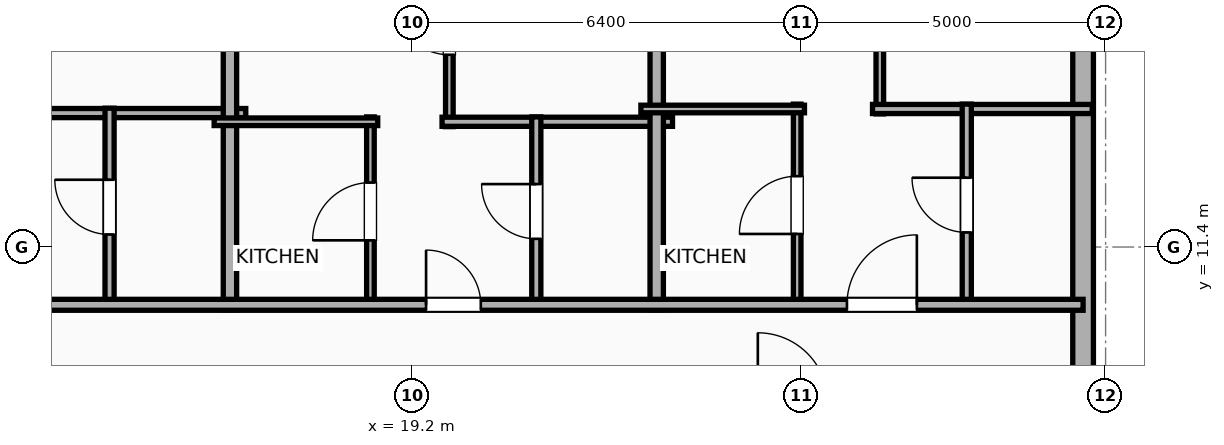
"""IFC4 building model, lengths in metres.
Left out: names, types, materials, properties, quantities, classifications, styles, units other than length and angle.
Written with IfcOpenShell. Run it as: python <this file> out.ifc"""

import sys

from ifc_helpers import new_model, si_unit, direction, frame, frame_2d, origin, place, context, subcontext, project, spatial, rectangle, extrude, element, fill, save


model = new_model("IFC4")
c1 = context("Model", 3, precision=1e-05, world=origin(), true_north=direction((0.0, 1.0)))
c2 = subcontext(c1, "Body", "Model", "MODEL_VIEW")
j1 = project(units=[si_unit("LENGTHUNIT", "METRE"), si_unit("PLANEANGLEUNIT", "RADIAN")], contexts=[c1])
p1 = place(None, origin())
s1 = spatial("IfcSite", under=j1, at=p1, CompositionType="ELEMENT")
p2 = place(p1, origin())
s2 = spatial("IfcBuilding", under=s1, at=p2, CompositionType="ELEMENT")
p3 = place(p2, frame((0.0, 0.0, 239.2)))
s3 = spatial("IfcBuildingStorey", under=s2, at=p3, CompositionType="ELEMENT", Elevation=239.2)
p4 = place(p3, frame((30.23, 16.583, 0.0), z_axis=(0.0, 0.0, 1.0), x_axis=(0.0, -1.0, 0.0)))
e1 = element("IfcWall", 1, at=p4, inside=s3, PredefinedType="ELEMENTEDWALL", context=c2, shape_type="SweptSolid", body=[
    extrude(rectangle(XDim=31.967, YDim=0.34, at=frame_2d((15.983, 0.0))), origin(), (0.0, 0.0, 1.0), 3.65),
])
p5 = place(p4, frame((29.924, 0.0, 0.75)))
e2 = element("IfcOpeningElement", 2, at=p5, cuts=e1, PredefinedType="OPENING", context=c2, shape_type="SweptSolid", body=[
    extrude(rectangle(XDim=1.2, YDim=2.05, at=frame_2d((0.6, 1.025))), frame((0.0, 0.18, 0.0), z_axis=(0.0, -1.0, 0.0), x_axis=(1.0, 0.0, 0.0)), (0.0, 0.0, 1.0), 0.36),
])
p6 = place(p4, frame((11.463, 0.0, 0.75)))
e3 = element("IfcOpeningElement", 3, at=p6, cuts=e1, PredefinedType="OPENING", context=c2, shape_type="SweptSolid", body=[
    extrude(rectangle(XDim=1.2, YDim=2.05, at=frame_2d((0.6, 1.025))), frame((0.0, 0.18, 0.0), z_axis=(0.0, -1.0, 0.0), x_axis=(1.0, 0.0, 0.0)), (0.0, 0.0, 1.0), 0.36),
])
p7 = place(p4, frame((20.363, 0.0, 0.75)))
e4 = element("IfcOpeningElement", 4, at=p7, cuts=e1, PredefinedType="OPENING", context=c2, shape_type="SweptSolid", body=[
    extrude(rectangle(XDim=1.2, YDim=2.05, at=frame_2d((0.6, 1.025))), frame((0.0, 0.18, 0.0), z_axis=(0.0, -1.0, 0.0), x_axis=(1.0, 0.0, 0.0)), (0.0, 0.0, 1.0), 0.36),
])
p8 = place(p3, frame((12.67, 13.603, 0.0), z_axis=(0.0, 0.0, 1.0), x_axis=(1.0, 0.0, 0.0)))
e5 = element("IfcWall", 5, at=p8, inside=s3, PredefinedType="PLUMBINGWALL", context=c2, shape_type="SweptSolid", body=[
    extrude(rectangle(XDim=3.79, YDim=0.15, at=frame_2d((1.895, 0.0))), origin(), (0.0, 0.0, 1.0), 3.65),
])
p9 = place(p3, frame((14.22, 10.43, 0.0), z_axis=(0.0, 0.0, 1.0), x_axis=(0.0, 1.0, 0.0)))
e6 = element("IfcWall", 6, at=p9, inside=s3, PredefinedType="PLUMBINGWALL", context=c2, shape_type="SweptSolid", body=[
    extrude(rectangle(XDim=3.253, YDim=0.15, at=frame_2d((1.626, 0.0))), origin(), (0.0, 0.0, 1.0), 3.65),
])
p10 = place(p9, frame((1.177, 0.0, 0.0)))
e7 = element("IfcOpeningElement", 7, at=p10, cuts=e6, PredefinedType="OPENING", context=c2, shape_type="SweptSolid", body=[
    extrude(rectangle(XDim=0.9, YDim=2.05, at=frame_2d((0.45, 1.025))), frame((0.0, 0.085, 0.0), z_axis=(0.0, -1.0, 0.0), x_axis=(1.0, 0.0, 0.0)), (0.0, 0.0, 1.0), 0.17),
])
p11 = place(p3, frame((16.2, 10.37, 0.0), z_axis=(0.0, 0.0, 1.0), x_axis=(0.0, 1.0, 0.0)))
e8 = element("IfcWall", 8, at=p11, inside=s3, PredefinedType="PARTITIONING", context=c2, shape_type="SweptSolid", body=[
    extrude(rectangle(XDim=9.66, YDim=0.22, at=frame_2d((4.83, 0.0))), origin(), (0.0, 0.0, 1.0), 3.09),
])
p12 = place(p3, frame((19.808, 13.38, 0.0), z_axis=(0.0, 0.0, 1.0), x_axis=(0.0, 1.0, 0.0)))
e9 = element("IfcWall", 9, at=p12, inside=s3, PredefinedType="PARTITIONING", context=c2, shape_type="SweptSolid", body=[
    extrude(rectangle(XDim=6.8, YDim=0.125, at=frame_2d((3.4, 0.0))), origin(), (0.0, 0.0, 1.0), 3.65),
])
p13 = place(p12, frame((1.182, 0.0, 0.0)))
e10 = element("IfcOpeningElement", 10, at=p13, cuts=e9, PredefinedType="OPENING", context=c2, shape_type="SweptSolid", body=[
    extrude(rectangle(XDim=0.9, YDim=2.05, at=frame_2d((0.45, 1.025))), frame((0.0, 0.073, 0.0), z_axis=(0.0, -1.0, 0.0), x_axis=(1.0, 0.0, 0.0)), (0.0, 0.0, 1.0), 0.145),
])
p14 = place(p3, frame((19.688, 13.46, 0.0), z_axis=(0.0, 0.0, 1.0), x_axis=(1.0, 0.0, 0.0)))
e11 = element("IfcWall", 11, at=p14, inside=s3, PredefinedType="PLUMBINGWALL", context=c2, shape_type="SweptSolid", body=[
    extrude(rectangle(XDim=3.79, YDim=0.15, at=frame_2d((1.895, 0.0))), origin(), (0.0, 0.0, 1.0), 3.65),
])
p15 = place(p3, frame((18.51, 10.43, 0.0), z_axis=(0.0, 0.0, 1.0), x_axis=(0.0, 1.0, 0.0)))
e12 = element("IfcWall", 12, at=p15, inside=s3, PredefinedType="PARTITIONING", context=c2, shape_type="SweptSolid", body=[
    extrude(rectangle(XDim=3.11, YDim=0.125, at=frame_2d((1.555, 0.0))), origin(), (0.0, 0.0, 1.0), 3.65),
])
p16 = place(p15, frame((1.08, 0.0, 0.0)))
e13 = element("IfcOpeningElement", 13, at=p16, cuts=e12, PredefinedType="OPENING", context=c2, shape_type="SweptSolid", body=[
    extrude(rectangle(XDim=0.95, YDim=2.05, at=frame_2d((0.475, 1.025))), frame((0.0, 0.073, 0.0), z_axis=(0.0, -1.0, 0.0), x_axis=(1.0, 0.0, 0.0)), (0.0, 0.0, 1.0), 0.145),
])
p17 = place(p3, frame((15.94, 13.46, 0.0), z_axis=(0.0, 0.0, 1.0), x_axis=(1.0, 0.0, 0.0)))
e14 = element("IfcWall", 14, at=p17, inside=s3, PredefinedType="PARTITIONING", context=c2, shape_type="SweptSolid", body=[
    extrude(rectangle(XDim=2.69, YDim=0.125, at=frame_2d((1.345, 0.0))), origin(), (0.0, 0.0, 1.0), 3.65),
])
p18 = place(p3, frame((21.238, 10.43, 0.0), z_axis=(0.0, 0.0, 1.0), x_axis=(0.0, 1.0, 0.0)))
e15 = element("IfcWall", 15, at=p18, inside=s3, PredefinedType="PLUMBINGWALL", context=c2, shape_type="SweptSolid", body=[
    extrude(rectangle(XDim=3.11, YDim=0.15, at=frame_2d((1.555, 0.0))), origin(), (0.0, 0.0, 1.0), 3.65),
])
p19 = place(p18, frame((1.105, 0.0, 0.0)))
e16 = element("IfcOpeningElement", 16, at=p19, cuts=e15, PredefinedType="OPENING", context=c2, shape_type="SweptSolid", body=[
    extrude(rectangle(XDim=0.9, YDim=2.05, at=frame_2d((0.45, 1.025))), frame((0.0, 0.085, 0.0), z_axis=(0.0, -1.0, 0.0), x_axis=(1.0, 0.0, 0.0)), (0.0, 0.0, 1.0), 0.17),
])
p20 = place(p3, frame((23.218, 10.37, 0.0), z_axis=(0.0, 0.0, 1.0), x_axis=(0.0, 1.0, 0.0)))
e17 = element("IfcWall", 17, at=p20, inside=s3, PredefinedType="PARTITIONING", context=c2, shape_type="SweptSolid", body=[
    extrude(rectangle(XDim=9.66, YDim=0.22, at=frame_2d((4.83, 0.0))), origin(), (0.0, 0.0, 1.0), 3.65),
])
p21 = place(p3, frame((26.887, 13.59, 0.0), z_axis=(0.0, 0.0, 1.0), x_axis=(0.0, 1.0, 0.0)))
e18 = element("IfcWall", 18, at=p21, inside=s3, PredefinedType="PARTITIONING", context=c2, shape_type="SweptSolid", body=[
    extrude(rectangle(XDim=6.572, YDim=0.125, at=frame_2d((3.286, 0.0))), origin(), (0.0, 0.0, 1.0), 3.65),
])
p22 = place(p21, frame((1.127, 0.0, 0.0)))
e19 = element("IfcOpeningElement", 19, at=p22, cuts=e18, PredefinedType="OPENING", context=c2, shape_type="SweptSolid", body=[
    extrude(rectangle(XDim=0.9, YDim=2.05, at=frame_2d((0.45, 1.025))), frame((0.0, 0.073, 0.0), z_axis=(0.0, -1.0, 0.0), x_axis=(1.0, 0.0, 0.0)), (0.0, 0.0, 1.0), 0.145),
])
p23 = place(p3, frame((26.767, 13.67, 0.0), z_axis=(0.0, 0.0, 1.0), x_axis=(1.0, 0.0, 0.0)))
e20 = element("IfcWall", 20, at=p23, inside=s3, PredefinedType="PLUMBINGWALL", context=c2, shape_type="SweptSolid", body=[
    extrude(rectangle(XDim=3.613, YDim=0.15, at=frame_2d((1.806, 0.0))), origin(), (0.0, 0.0, 1.0), 3.65),
])
p24 = place(p3, frame((25.528, 10.43, 0.0), z_axis=(0.0, 0.0, 1.0), x_axis=(0.0, 1.0, 0.0)))
e21 = element("IfcWall", 21, at=p24, inside=s3, PredefinedType="PARTITIONING", context=c2, shape_type="SweptSolid", body=[
    extrude(rectangle(XDim=3.32, YDim=0.125, at=frame_2d((1.66, 0.0))), origin(), (0.0, 0.0, 1.0), 3.65),
])
p25 = place(p24, frame((1.185, 0.0, 0.0)))
e22 = element("IfcOpeningElement", 22, at=p25, cuts=e21, PredefinedType="OPENING", context=c2, shape_type="SweptSolid", body=[
    extrude(rectangle(XDim=0.95, YDim=2.05, at=frame_2d((0.475, 1.025))), frame((0.0, 0.073, 0.0), z_axis=(0.0, -1.0, 0.0), x_axis=(1.0, 0.0, 0.0)), (0.0, 0.0, 1.0), 0.145),
])
p26 = place(p3, frame((22.958, 13.67, 0.0), z_axis=(0.0, 0.0, 1.0), x_axis=(1.0, 0.0, 0.0)))
e23 = element("IfcWall", 23, at=p26, inside=s3, PredefinedType="PARTITIONING", context=c2, shape_type="SweptSolid", body=[
    extrude(rectangle(XDim=2.69, YDim=0.125, at=frame_2d((1.345, 0.0))), origin(), (0.0, 0.0, 1.0), 3.65),
])
p27 = place(p3, frame((28.317, 10.43, 0.0), z_axis=(0.0, 0.0, 1.0), x_axis=(0.0, 1.0, 0.0)))
e24 = element("IfcWall", 24, at=p27, inside=s3, PredefinedType="PLUMBINGWALL", context=c2, shape_type="SweptSolid", body=[
    extrude(rectangle(XDim=3.32, YDim=0.15, at=frame_2d((1.66, 0.0))), origin(), (0.0, 0.0, 1.0), 3.65),
])
p28 = place(p27, frame((1.21, 0.0, 0.0)))
e25 = element("IfcOpeningElement", 25, at=p28, cuts=e24, PredefinedType="OPENING", context=c2, shape_type="SweptSolid", body=[
    extrude(rectangle(XDim=0.9, YDim=2.05, at=frame_2d((0.45, 1.025))), frame((0.0, 0.085, 0.0), z_axis=(0.0, -1.0, 0.0), x_axis=(1.0, 0.0, 0.0)), (0.0, 0.0, 1.0), 0.17),
])
p29 = place(p3, frame((-26.23, 10.45, 0.0), z_axis=(0.0, 0.0, 1.0), x_axis=(1.0, 0.0, 0.0)))
e26 = element("IfcWall", 26, at=p29, inside=s3, PredefinedType="PARTITIONING", context=c2, shape_type="SweptSolid", body=[
    extrude(rectangle(XDim=56.46, YDim=0.18, at=frame_2d((28.23, 0.0))), origin(), (0.0, 0.0, 1.0), 3.65),
])
p30 = place(p29, frame((4.41, 0.0, 0.0)))
e27 = element("IfcOpeningElement", 27, at=p30, cuts=e26, PredefinedType="OPENING", context=c2, shape_type="SweptSolid", body=[
    extrude(rectangle(XDim=1.15, YDim=2.05, at=frame_2d((0.575, 1.025))), frame((0.0, 0.1, 0.0), z_axis=(0.0, -1.0, 0.0), x_axis=(1.0, 0.0, 0.0)), (0.0, 0.0, 1.0), 0.2),
])
p31 = place(p29, frame((11.943, 0.0, 0.0)))
e28 = element("IfcOpeningElement", 28, at=p31, cuts=e26, PredefinedType="OPENING", context=c2, shape_type="SweptSolid", body=[
    extrude(rectangle(XDim=0.9, YDim=2.05, at=frame_2d((0.45, 1.025))), frame((0.0, 0.1, 0.0), z_axis=(0.0, -1.0, 0.0), x_axis=(1.0, 0.0, 0.0)), (0.0, 0.0, 1.0), 0.2),
])
p32 = place(p29, frame((18.243, 0.0, 0.0)))
e29 = element("IfcOpeningElement", 29, at=p32, cuts=e26, PredefinedType="OPENING", context=c2, shape_type="SweptSolid", body=[
    extrude(rectangle(XDim=1.15, YDim=2.05, at=frame_2d((0.575, 1.025))), frame((0.0, 0.1, 0.0), z_axis=(0.0, -1.0, 0.0), x_axis=(1.0, 0.0, 0.0)), (0.0, 0.0, 1.0), 0.2),
])
p33 = place(p29, frame((22.941, 0.0, 0.0)))
e30 = element("IfcOpeningElement", 30, at=p33, cuts=e26, PredefinedType="OPENING", context=c2, shape_type="SweptSolid", body=[
    extrude(rectangle(XDim=0.9, YDim=2.05, at=frame_2d((0.45, 1.025))), frame((0.0, 0.1, 0.0), z_axis=(0.0, -1.0, 0.0), x_axis=(1.0, 0.0, 0.0)), (0.0, 0.0, 1.0), 0.2),
])
p34 = place(p29, frame((27.028, 0.0, 0.0)))
e31 = element("IfcOpeningElement", 31, at=p34, cuts=e26, PredefinedType="OPENING", context=c2, shape_type="SweptSolid", body=[
    extrude(rectangle(XDim=1.15, YDim=2.05, at=frame_2d((0.575, 1.025))), frame((0.0, 0.1, 0.0), z_axis=(0.0, -1.0, 0.0), x_axis=(1.0, 0.0, 0.0)), (0.0, 0.0, 1.0), 0.2),
])
p35 = place(p29, frame((36.864, 0.0, 0.0)))
e32 = element("IfcOpeningElement", 32, at=p35, cuts=e26, PredefinedType="OPENING", context=c2, shape_type="SweptSolid", body=[
    extrude(rectangle(XDim=1.15, YDim=2.05, at=frame_2d((0.575, 1.025))), frame((0.0, 0.1, 0.0), z_axis=(0.0, -1.0, 0.0), x_axis=(1.0, 0.0, 0.0)), (0.0, 0.0, 1.0), 0.2),
])
p36 = place(p29, frame((45.655, 0.0, 0.0)))
e33 = element("IfcOpeningElement", 33, at=p36, cuts=e26, PredefinedType="OPENING", context=c2, shape_type="SweptSolid", body=[
    extrude(rectangle(XDim=0.9, YDim=2.05, at=frame_2d((0.45, 1.025))), frame((0.0, 0.1, 0.0), z_axis=(0.0, -1.0, 0.0), x_axis=(1.0, 0.0, 0.0)), (0.0, 0.0, 1.0), 0.2),
])
p37 = place(p29, frame((52.576, 0.0, 0.0)))
e34 = element("IfcOpeningElement", 34, at=p37, cuts=e26, PredefinedType="OPENING", context=c2, shape_type="SweptSolid", body=[
    extrude(rectangle(XDim=1.15, YDim=2.05, at=frame_2d((0.575, 1.025))), frame((0.0, 0.1, 0.0), z_axis=(0.0, -1.0, 0.0), x_axis=(1.0, 0.0, 0.0)), (0.0, 0.0, 1.0), 0.2),
])
p38 = place(p10, origin())
e35 = element("IfcDoor", 35, at=p38, inside=s3, OperationType="SINGLE_SWING_RIGHT", PredefinedType="DOOR", context=c2, shape_type="SweptSolid", body=[
    extrude(rectangle(XDim=0.9, YDim=2.05, at=frame_2d((0.45, 1.025))), frame((0.0, 0.025, 0.0), z_axis=(0.0, -1.0, 0.0), x_axis=(1.0, 0.0, 0.0)), (0.0, 0.0, 1.0), 0.05),
])
fill(e7, e35)
p39 = place(p13, origin())
e36 = element("IfcDoor", 36, at=p39, inside=s3, OperationType="SINGLE_SWING_RIGHT", PredefinedType="DOOR", context=c2, shape_type="SweptSolid", body=[
    extrude(rectangle(XDim=0.9, YDim=2.05, at=frame_2d((0.45, 1.025))), frame((0.0, 0.025, 0.0), z_axis=(0.0, -1.0, 0.0), x_axis=(1.0, 0.0, 0.0)), (0.0, 0.0, 1.0), 0.05),
])
fill(e10, e36)
p40 = place(p16, origin())
e37 = element("IfcDoor", 37, at=p40, inside=s3, OperationType="SINGLE_SWING_LEFT", PredefinedType="DOOR", context=c2, shape_type="SweptSolid", body=[
    extrude(rectangle(XDim=0.95, YDim=2.05, at=frame_2d((0.475, 1.025))), frame((0.0, 0.025, 0.0), z_axis=(0.0, -1.0, 0.0), x_axis=(1.0, 0.0, 0.0)), (0.0, 0.0, 1.0), 0.05),
])
fill(e13, e37)
p41 = place(p19, origin())
e38 = element("IfcDoor", 38, at=p41, inside=s3, OperationType="SINGLE_SWING_RIGHT", PredefinedType="DOOR", context=c2, shape_type="SweptSolid", body=[
    extrude(rectangle(XDim=0.9, YDim=2.05, at=frame_2d((0.45, 1.025))), frame((0.0, 0.025, 0.0), z_axis=(0.0, -1.0, 0.0), x_axis=(1.0, 0.0, 0.0)), (0.0, 0.0, 1.0), 0.05),
])
fill(e16, e38)
p42 = place(p25, origin())
e39 = element("IfcDoor", 39, at=p42, inside=s3, OperationType="SINGLE_SWING_LEFT", PredefinedType="DOOR", context=c2, shape_type="SweptSolid", body=[
    extrude(rectangle(XDim=0.95, YDim=2.05, at=frame_2d((0.475, 1.025))), frame((0.0, 0.025, 0.0), z_axis=(0.0, -1.0, 0.0), x_axis=(1.0, 0.0, 0.0)), (0.0, 0.0, 1.0), 0.05),
])
fill(e22, e39)
p43 = place(p28, origin())
e40 = element("IfcDoor", 40, at=p43, inside=s3, OperationType="SINGLE_SWING_RIGHT", PredefinedType="DOOR", context=c2, shape_type="SweptSolid", body=[
    extrude(rectangle(XDim=0.9, YDim=2.05, at=frame_2d((0.45, 1.025))), frame((0.0, 0.025, 0.0), z_axis=(0.0, -1.0, 0.0), x_axis=(1.0, 0.0, 0.0)), (0.0, 0.0, 1.0), 0.05),
])
fill(e25, e40)
p44 = place(p36, origin())
e41 = element("IfcDoor", 41, at=p44, inside=s3, OperationType="SINGLE_SWING_LEFT", PredefinedType="DOOR", context=c2, shape_type="SweptSolid", body=[
    extrude(rectangle(XDim=0.9, YDim=2.05, at=frame_2d((0.45, 1.025))), frame((0.0, 0.025, 0.0), z_axis=(0.0, -1.0, 0.0), x_axis=(1.0, 0.0, 0.0)), (0.0, 0.0, 1.0), 0.05),
])
fill(e33, e41)
p45 = place(p37, origin())
e42 = element("IfcDoor", 42, at=p45, inside=s3, OperationType="SINGLE_SWING_RIGHT", PredefinedType="DOOR", context=c2, shape_type="SweptSolid", body=[
    extrude(rectangle(XDim=1.15, YDim=2.05, at=frame_2d((0.575, 1.025))), frame((0.0, 0.025, 0.0), z_axis=(0.0, -1.0, 0.0), x_axis=(1.0, 0.0, 0.0)), (0.0, 0.0, 1.0), 0.05),
])
fill(e34, e42)
save(model, sys.argv[1])
